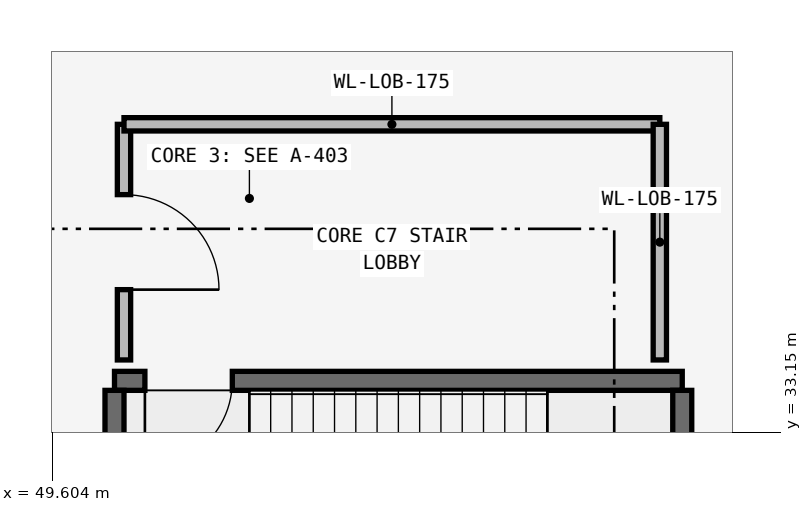
"""IFC4 building model, lengths in metres.
Left out: names, types, materials, properties, quantities, classifications, styles, units other than length and angle.
Written with IfcOpenShell. Run it as: python <this file> out.ifc"""

import sys

from ifc_helpers import new_model, si_unit, direction, frame, frame_2d, origin, place, context, subcontext, project, spatial, rectangle, extrude, element, fill, save


model = new_model("IFC4")
c1 = context("Model", 3, precision=1e-05, world=origin(), true_north=direction((0.0, 1.0)))
c2 = subcontext(c1, "Body", "Model", "MODEL_VIEW")
j1 = project(units=[si_unit("LENGTHUNIT", "METRE"), si_unit("PLANEANGLEUNIT", "RADIAN")], contexts=[c1])
p1 = place(None, origin())
s1 = spatial("IfcSite", under=j1, at=p1, CompositionType="ELEMENT")
p2 = place(p1, origin())
s2 = spatial("IfcBuilding", under=s1, at=p2, CompositionType="ELEMENT")
p3 = place(p2, origin())
s3 = spatial("IfcBuildingStorey", under=s2, at=p3, CompositionType="ELEMENT", Elevation=0.0)
p4 = place(p3, frame((50.425, 33.825, 0.0), z_axis=(0.0, 0.0, 1.0), x_axis=(1.0, 0.0, 0.0)))
e1 = element("IfcWall", 1, at=p4, inside=s3, PredefinedType="SHEAR", context=c2, shape_type="SweptSolid", body=[
    extrude(rectangle(XDim=7.47, YDim=0.25, at=frame_2d((3.735, 0.0))), origin(), (0.0, 0.0, 1.0), 5.08),
])
p5 = place(p4, frame((0.4, 0.0, 0.0)))
e2 = element("IfcOpeningElement", 2, at=p5, cuts=e1, PredefinedType="OPENING", context=c2, shape_type="SweptSolid", body=[
    extrude(rectangle(XDim=1.15, YDim=2.15, at=frame_2d((0.575, 1.075))), frame((0.0, 0.14, 0.0), z_axis=(0.0, -1.0, 0.0), x_axis=(1.0, 0.0, 0.0)), (0.0, 0.0, 1.0), 0.28),
])
for number, where, z_axis, x_axis in (
    (3, (50.425, 30.2, 0.0), (0.0, 0.0, 1.0), (0.0, 1.0, 0.0)),
    (4, (57.895, 30.2, 0.0), (0.0, 0.0, 1.0), (0.0, 1.0, 0.0)),
):
    element("IfcWall", number, at=place(p3, frame(where, z_axis=z_axis, x_axis=x_axis)), inside=s3, PredefinedType="SHEAR", context=c2, shape_type="SweptSolid", body=[
        extrude(rectangle(XDim=3.5, YDim=0.25, at=frame_2d((1.75, 0.0))), origin(), (0.0, 0.0, 1.0), 5.08),
    ])
p6 = place(p3, frame((50.55, 34.1, 0.0), z_axis=(0.0, 0.0, 1.0), x_axis=(0.0, 1.0, 0.0)))
e5 = element("IfcWall", 5, at=p6, inside=s3, PredefinedType="PARTITIONING", context=c2, shape_type="SweptSolid", body=[
    extrude(rectangle(XDim=3.1, YDim=0.175, at=frame_2d((1.55, 0.0))), origin(), (0.0, 0.0, 1.0), 5.08),
])
p7 = place(p6, frame((0.925, 0.0, 0.0)))
e6 = element("IfcOpeningElement", 6, at=p7, cuts=e5, PredefinedType="OPENING", context=c2, shape_type="SweptSolid", body=[
    extrude(rectangle(XDim=1.25, YDim=2.2, at=frame_2d((0.625, 1.1))), frame((0.0, 0.103, 0.0), z_axis=(0.0, -1.0, 0.0), x_axis=(1.0, 0.0, 0.0)), (0.0, 0.0, 1.0), 0.205),
])
p8 = place(p3, frame((50.55, 37.2, 0.0), z_axis=(0.0, 0.0, 1.0), x_axis=(1.0, 0.0, 0.0)))
e7 = element("IfcWall", 7, at=p8, inside=s3, PredefinedType="PARTITIONING", context=c2, shape_type="SweptSolid", body=[
    extrude(rectangle(XDim=7.05, YDim=0.175, at=frame_2d((3.525, 0.0))), origin(), (0.0, 0.0, 1.0), 5.08),
])
p9 = place(p3, frame((57.6, 34.1, 0.0), z_axis=(0.0, 0.0, 1.0), x_axis=(0.0, 1.0, 0.0)))
e8 = element("IfcWall", 8, at=p9, inside=s3, PredefinedType="PARTITIONING", context=c2, shape_type="SweptSolid", body=[
    extrude(rectangle(XDim=3.1, YDim=0.175, at=frame_2d((1.55, 0.0))), origin(), (0.0, 0.0, 1.0), 5.08),
])
p10 = place(p5, origin())
e9 = element("IfcDoor", 9, at=p10, inside=s3, OperationType="SINGLE_SWING_LEFT", PredefinedType="DOOR", context=c2, shape_type="SweptSolid", body=[
    extrude(rectangle(XDim=1.15, YDim=2.15, at=frame_2d((0.575, 1.075))), frame((0.0, 0.025, 0.0), z_axis=(0.0, -1.0, 0.0), x_axis=(1.0, 0.0, 0.0)), (0.0, 0.0, 1.0), 0.05),
])
fill(e2, e9)
p11 = place(p7, frame((1.25, 0.0, 0.0), z_axis=(0.0, 0.0, 1.0), x_axis=(-1.0, 0.0, 0.0)))
e10 = element("IfcDoor", 10, at=p11, inside=s3, OperationType="SINGLE_SWING_LEFT", PredefinedType="DOOR", context=c2, shape_type="SweptSolid", body=[
    extrude(rectangle(XDim=1.25, YDim=2.2, at=frame_2d((0.625, 1.1))), frame((0.0, 0.025, 0.0), z_axis=(0.0, -1.0, 0.0), x_axis=(1.0, 0.0, 0.0)), (0.0, 0.0, 1.0), 0.05),
])
fill(e6, e10)
save(model, sys.argv[1])
